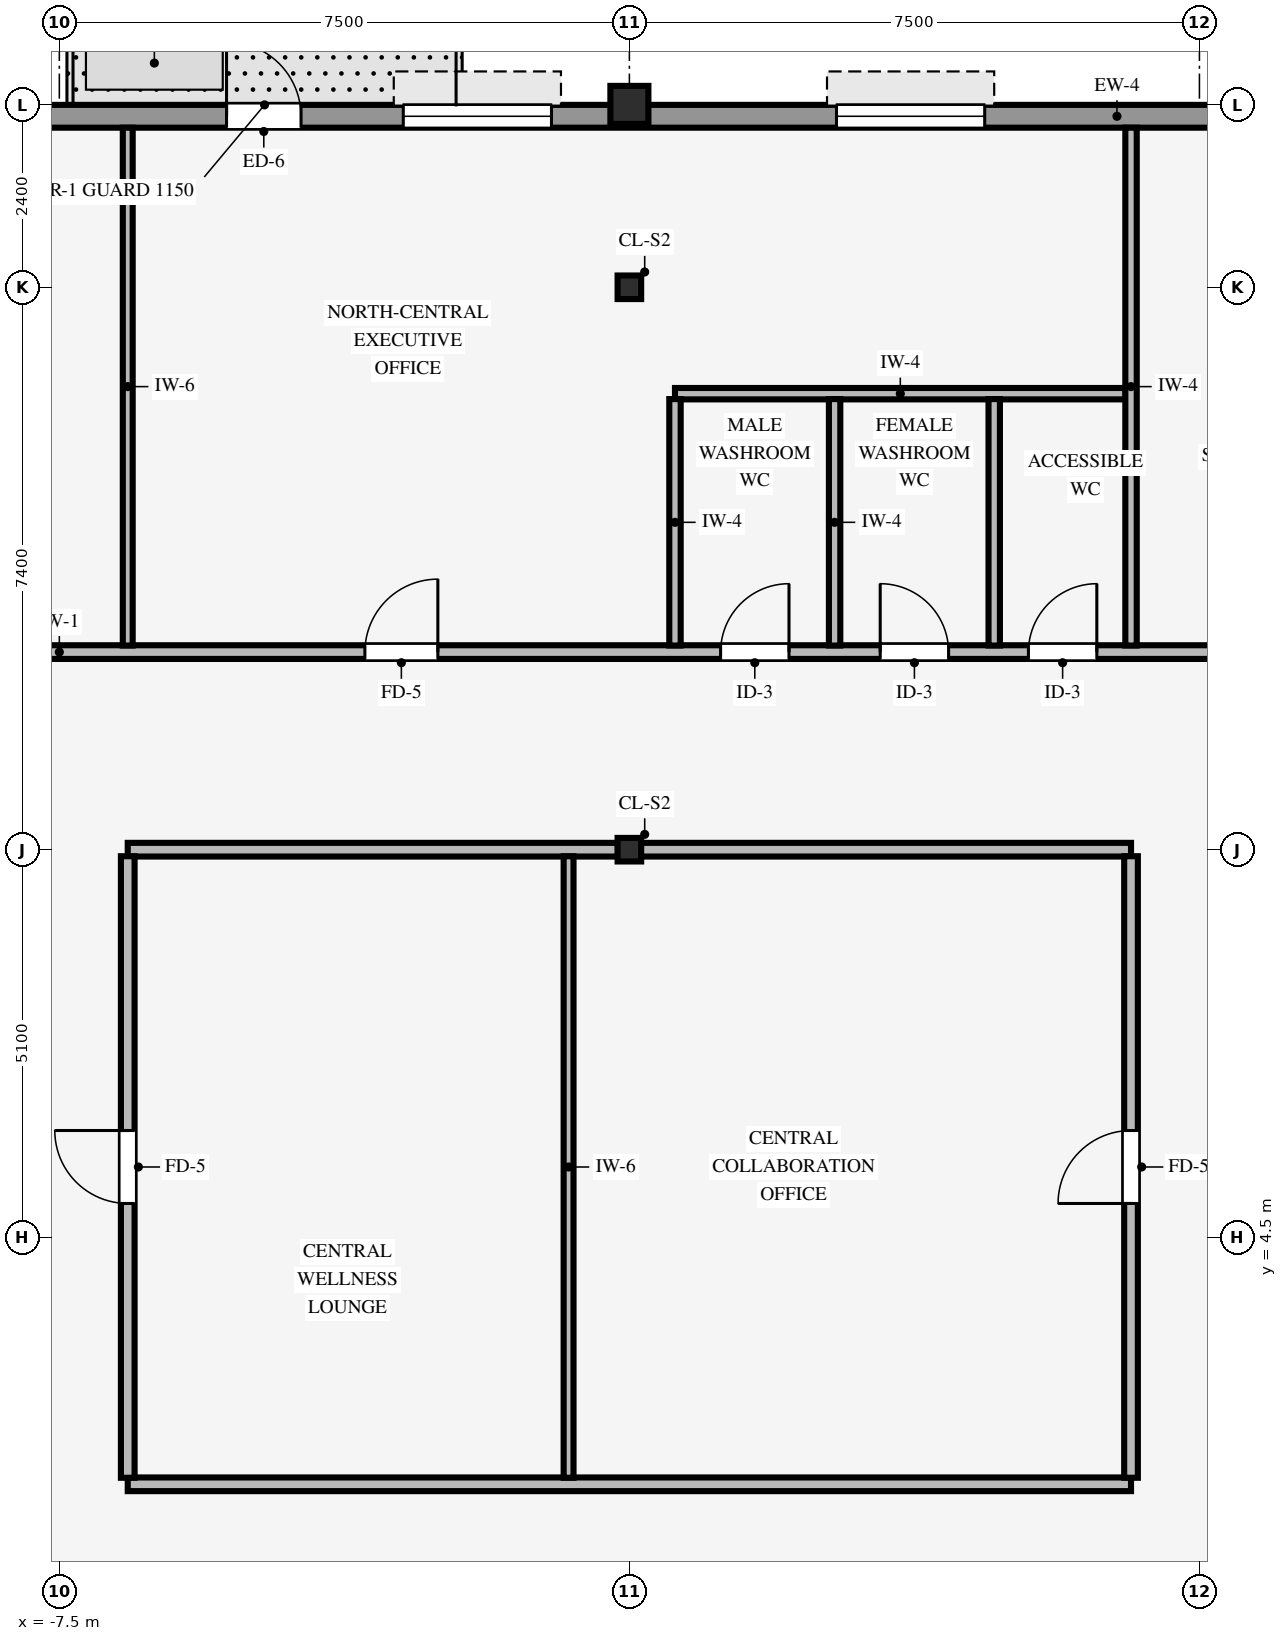
"""IFC4 building model, lengths in metres.
Left out: names, types, materials, properties, quantities, classifications, styles, units other than length and angle.
Written with IfcOpenShell. Run it as: python <this file> out.ifc"""

import sys

from ifc_helpers import new_model, si_unit, direction, frame, frame_2d, origin, origin_2d, place, context, subcontext, project, spatial, rectangle, hollow_rectangle, i_section, extrude, source, transform, mapped, element, fill, save


model = new_model("IFC4")
c1 = context("Model", 3, precision=1e-05, world=origin(), true_north=direction((0.0, 1.0)))
c2 = subcontext(c1, "Body", "Model", "MODEL_VIEW")
j1 = project(units=[si_unit("LENGTHUNIT", "METRE"), si_unit("PLANEANGLEUNIT", "RADIAN")], contexts=[c1])
p1 = place(None, origin())
s1 = spatial("IfcSite", under=j1, at=p1, CompositionType="ELEMENT")
p2 = place(p1, origin())
s2 = spatial("IfcBuilding", under=s1, at=p2, CompositionType="ELEMENT")
p3 = place(p2, frame((0.0, 0.0, 279.85)))
s3 = spatial("IfcBuildingStorey", under=s2, at=p3, CompositionType="ELEMENT", Elevation=279.85)
p4 = place(p3, frame((0.0, 19.4, 0.0), z_axis=(0.0, 0.0, 1.0), x_axis=(1.0, 0.0, 0.0)))
e1 = element("IfcColumn", 1, at=p4, inside=s3, PredefinedType="COLUMN", context=c2, shape_type="SweptSolid", body=[
    extrude(hollow_rectangle(XDim=0.5, YDim=0.5, WallThickness=0.032, InnerFilletRadius=0.032, OuterFilletRadius=0.064, at=origin_2d()), origin(), (0.0, 0.0, 1.0), 3.37),
])
for number, where, z_axis, x_axis in (
    (2, (0.0, 9.6, 0.0), (0.0, 0.0, 1.0), (1.0, 0.0, 0.0)),
    (3, (0.0, 17.0, 0.0), (0.0, 0.0, 1.0), (1.0, 0.0, 0.0)),
):
    element("IfcColumn", number, at=place(p3, frame(where, z_axis=z_axis, x_axis=x_axis)), inside=s3, PredefinedType="COLUMN", context=c2, shape_type="SweptSolid", body=[
        extrude(i_section(OverallWidth=0.31, OverallDepth=0.31, WebThickness=0.015, FlangeThickness=0.015, FilletRadius=0.015, at=origin_2d()), origin(), (0.0, 0.0, 1.0), 3.37),
    ])
p5 = place(p3, frame((-18.9, 19.25, 0.0), z_axis=(0.0, 0.0, 1.0), x_axis=(1.0, 0.0, 0.0)))
e4 = element("IfcWall", 4, at=p5, inside=s3, PredefinedType="STANDARD", context=c2, shape_type="SweptSolid", body=[
    extrude(rectangle(XDim=35.6, YDim=0.3, at=frame_2d((17.8, 0.0))), origin(), (0.0, 0.0, 1.0), 2.705),
])
p6 = place(p5, frame((13.6, 0.0, 0.0)))
e5 = element("IfcOpeningElement", 5, at=p6, cuts=e4, PredefinedType="OPENING", context=c2, shape_type="SweptSolid", body=[
    extrude(rectangle(XDim=0.98, YDim=2.15, at=frame_2d((0.49, 1.075))), frame((0.0, 0.16, 0.0), z_axis=(0.0, -1.0, 0.0), x_axis=(1.0, 0.0, 0.0)), (0.0, 0.0, 1.0), 0.32),
])
p7 = place(p5, frame((2.425, 0.0, 0.8)))
e6 = element("IfcOpeningElement", 6, at=p7, cuts=e4, PredefinedType="OPENING", context=c2, shape_type="SweptSolid", body=[
    extrude(rectangle(XDim=1.95, YDim=1.48, at=frame_2d((0.975, 0.74))), frame((0.0, 0.16, 0.0), z_axis=(0.0, -1.0, 0.0), x_axis=(1.0, 0.0, 0.0)), (0.0, 0.0, 1.0), 0.32),
])
p8 = place(p5, frame((7.225, 0.0, 0.8)))
e7 = element("IfcOpeningElement", 7, at=p8, cuts=e4, PredefinedType="OPENING", context=c2, shape_type="SweptSolid", body=[
    extrude(rectangle(XDim=1.95, YDim=1.48, at=frame_2d((0.975, 0.74))), frame((0.0, 0.16, 0.0), z_axis=(0.0, -1.0, 0.0), x_axis=(1.0, 0.0, 0.0)), (0.0, 0.0, 1.0), 0.32),
])
p9 = place(p5, frame((15.925, 0.0, 0.8)))
e8 = element("IfcOpeningElement", 8, at=p9, cuts=e4, PredefinedType="OPENING", context=c2, shape_type="SweptSolid", body=[
    extrude(rectangle(XDim=1.95, YDim=1.48, at=frame_2d((0.975, 0.74))), frame((0.0, 0.16, 0.0), z_axis=(0.0, -1.0, 0.0), x_axis=(1.0, 0.0, 0.0)), (0.0, 0.0, 1.0), 0.32),
])
p10 = place(p5, frame((21.625, 0.0, 0.8)))
e9 = element("IfcOpeningElement", 9, at=p10, cuts=e4, PredefinedType="OPENING", context=c2, shape_type="SweptSolid", body=[
    extrude(rectangle(XDim=1.95, YDim=1.48, at=frame_2d((0.975, 0.74))), frame((0.0, 0.16, 0.0), z_axis=(0.0, -1.0, 0.0), x_axis=(1.0, 0.0, 0.0)), (0.0, 0.0, 1.0), 0.32),
])
p11 = place(p5, frame((31.225, 0.0, 0.8)))
e10 = element("IfcOpeningElement", 10, at=p11, cuts=e4, PredefinedType="OPENING", context=c2, shape_type="SweptSolid", body=[
    extrude(rectangle(XDim=1.95, YDim=1.48, at=frame_2d((0.975, 0.74))), frame((0.0, 0.16, 0.0), z_axis=(0.0, -1.0, 0.0), x_axis=(1.0, 0.0, 0.0)), (0.0, 0.0, 1.0), 0.32),
])
p12 = place(p3, frame((-6.6, 1.25, 0.0), z_axis=(0.0, 0.0, 1.0), x_axis=(1.0, 0.0, 0.0)))
e11 = element("IfcWall", 11, at=p12, inside=s3, PredefinedType="PARTITIONING", context=c2, shape_type="SweptSolid", body=[
    extrude(rectangle(XDim=13.2, YDim=0.18, at=frame_2d((6.6, 0.0))), origin(), (0.0, 0.0, 1.0), 3.36),
])
for number, where, z_axis, x_axis in (
    (12, (-6.6, 9.6, 0.0), (0.0, 0.0, 1.0), (1.0, 0.0, 0.0)),
    (13, (0.151, 9.6, 0.0), (0.0, 0.0, 1.0), (1.0, 0.0, 0.0)),
):
    element("IfcWall", number, at=place(p3, frame(where, z_axis=z_axis, x_axis=x_axis)), inside=s3, PredefinedType="PARTITIONING", context=c2, shape_type="SweptSolid", body=[
        extrude(rectangle(XDim=6.449, YDim=0.18, at=frame_2d((3.225, 0.0))), origin(), (0.0, 0.0, 1.0), 2.405),
    ])
p13 = place(p3, frame((-15.0, 12.2, 0.0), z_axis=(0.0, 0.0, 1.0), x_axis=(1.0, 0.0, 0.0)))
e14 = element("IfcWall", 14, at=p13, inside=s3, PredefinedType="PARTITIONING", context=c2, shape_type="SweptSolid", body=[
    extrude(rectangle(XDim=30.8, YDim=0.18, at=frame_2d((15.4, 0.0))), origin(), (0.0, 0.0, 1.0), 3.36),
])
p14 = place(p13, frame((11.52, 0.0, 0.0)))
e15 = element("IfcOpeningElement", 15, at=p14, cuts=e14, PredefinedType="OPENING", context=c2, shape_type="SweptSolid", body=[
    extrude(rectangle(XDim=0.96, YDim=2.1, at=frame_2d((0.48, 1.05))), frame((0.0, 0.1, 0.0), z_axis=(0.0, -1.0, 0.0), x_axis=(1.0, 0.0, 0.0)), (0.0, 0.0, 1.0), 0.2),
])
p15 = place(p13, frame((2.52, 0.0, 0.0)))
e16 = element("IfcOpeningElement", 16, at=p15, cuts=e14, PredefinedType="OPENING", context=c2, shape_type="SweptSolid", body=[
    extrude(rectangle(XDim=0.96, YDim=2.1, at=frame_2d((0.48, 1.05))), frame((0.0, 0.1, 0.0), z_axis=(0.0, -1.0, 0.0), x_axis=(1.0, 0.0, 0.0)), (0.0, 0.0, 1.0), 0.2),
])
p16 = place(p13, frame((28.32, 0.0, 0.0)))
e17 = element("IfcOpeningElement", 17, at=p16, cuts=e14, PredefinedType="OPENING", context=c2, shape_type="SweptSolid", body=[
    extrude(rectangle(XDim=0.96, YDim=2.1, at=frame_2d((0.48, 1.05))), frame((0.0, 0.1, 0.0), z_axis=(0.0, -1.0, 0.0), x_axis=(1.0, 0.0, 0.0)), (0.0, 0.0, 1.0), 0.2),
])
p17 = place(p13, frame((24.92, 0.0, 0.0)))
e18 = element("IfcOpeningElement", 18, at=p17, cuts=e14, PredefinedType="OPENING", context=c2, shape_type="SweptSolid", body=[
    extrude(rectangle(XDim=0.96, YDim=2.1, at=frame_2d((0.48, 1.05))), frame((0.0, 0.1, 0.0), z_axis=(0.0, -1.0, 0.0), x_axis=(1.0, 0.0, 0.0)), (0.0, 0.0, 1.0), 0.2),
])
p18 = place(p13, frame((16.2, 0.0, 0.0)))
e19 = element("IfcOpeningElement", 19, at=p18, cuts=e14, PredefinedType="OPENING", context=c2, shape_type="SweptSolid", body=[
    extrude(rectangle(XDim=0.9, YDim=2.1, at=frame_2d((0.45, 1.05))), frame((0.0, 0.1, 0.0), z_axis=(0.0, -1.0, 0.0), x_axis=(1.0, 0.0, 0.0)), (0.0, 0.0, 1.0), 0.2),
])
p19 = place(p13, frame((18.3, 0.0, 0.0)))
e20 = element("IfcOpeningElement", 20, at=p19, cuts=e14, PredefinedType="OPENING", context=c2, shape_type="SweptSolid", body=[
    extrude(rectangle(XDim=0.9, YDim=2.1, at=frame_2d((0.45, 1.05))), frame((0.0, 0.1, 0.0), z_axis=(0.0, -1.0, 0.0), x_axis=(1.0, 0.0, 0.0)), (0.0, 0.0, 1.0), 0.2),
])
p20 = place(p13, frame((20.25, 0.0, 0.0)))
e21 = element("IfcOpeningElement", 21, at=p20, cuts=e14, PredefinedType="OPENING", context=c2, shape_type="SweptSolid", body=[
    extrude(rectangle(XDim=0.9, YDim=2.1, at=frame_2d((0.45, 1.05))), frame((0.0, 0.1, 0.0), z_axis=(0.0, -1.0, 0.0), x_axis=(1.0, 0.0, 0.0)), (0.0, 0.0, 1.0), 0.2),
])
p21 = place(p3, frame((0.6, 15.6, 0.0), z_axis=(0.0, 0.0, 1.0), x_axis=(1.0, 0.0, 0.0)))
e22 = element("IfcWall", 22, at=p21, inside=s3, PredefinedType="PARTITIONING", context=c2, shape_type="SweptSolid", body=[
    extrude(rectangle(XDim=5.929, YDim=0.15, at=frame_2d((2.964, 0.0))), origin(), (0.0, 0.0, 1.0), 3.36),
])
p22 = place(p3, frame((-6.6, 1.336, 0.0), z_axis=(0.0, 0.0, 1.0), x_axis=(0.0, 1.0, 0.0)))
e23 = element("IfcWall", 23, at=p22, inside=s3, PredefinedType="PARTITIONING", context=c2, shape_type="SweptSolid", body=[
    extrude(rectangle(XDim=8.178, YDim=0.18, at=frame_2d((4.089, 0.0))), origin(), (0.0, 0.0, 1.0), 3.36),
])
p23 = place(p22, frame((3.609, 0.0, 0.0)))
e24 = element("IfcOpeningElement", 24, at=p23, cuts=e23, PredefinedType="OPENING", context=c2, shape_type="SweptSolid", body=[
    extrude(rectangle(XDim=0.96, YDim=2.1, at=frame_2d((0.48, 1.05))), frame((0.0, 0.1, 0.0), z_axis=(0.0, -1.0, 0.0), x_axis=(1.0, 0.0, 0.0)), (0.0, 0.0, 1.0), 0.2),
])
p24 = place(p3, frame((-6.6, 12.286, 0.0), z_axis=(0.0, 0.0, 1.0), x_axis=(0.0, 1.0, 0.0)))
e25 = element("IfcWall", 25, at=p24, inside=s3, PredefinedType="PARTITIONING", context=c2, shape_type="SweptSolid", body=[
    extrude(rectangle(XDim=6.814, YDim=0.13, at=frame_2d((3.407, 0.0))), origin(), (0.0, 0.0, 1.0), 3.36),
])
p25 = place(p3, frame((-0.8, 1.336, 0.0), z_axis=(0.0, 0.0, 1.0), x_axis=(0.0, 1.0, 0.0)))
e26 = element("IfcWall", 26, at=p25, inside=s3, PredefinedType="PARTITIONING", context=c2, shape_type="SweptSolid", body=[
    extrude(rectangle(XDim=8.178, YDim=0.13, at=frame_2d((4.089, 0.0))), origin(), (0.0, 0.0, 1.0), 3.36),
])
for number, where, z_axis, x_axis in (
    (27, (0.6, 12.286, 0.0), (0.0, 0.0, 1.0), (0.0, 1.0, 0.0)),
    (28, (2.7, 12.286, 0.0), (0.0, 0.0, 1.0), (0.0, 1.0, 0.0)),
    (29, (4.8, 12.286, 0.0), (0.0, 0.0, 1.0), (0.0, 1.0, 0.0)),
):
    element("IfcWall", number, at=place(p3, frame(where, z_axis=z_axis, x_axis=x_axis)), inside=s3, PredefinedType="PARTITIONING", context=c2, shape_type="SweptSolid", body=[
        extrude(rectangle(XDim=3.243, YDim=0.15, at=frame_2d((1.622, 0.0))), origin(), (0.0, 0.0, 1.0), 3.36),
    ])
p26 = place(p3, frame((6.6, 1.336, 0.0), z_axis=(0.0, 0.0, 1.0), x_axis=(0.0, 1.0, 0.0)))
e30 = element("IfcWall", 30, at=p26, inside=s3, PredefinedType="PARTITIONING", context=c2, shape_type="SweptSolid", body=[
    extrude(rectangle(XDim=8.178, YDim=0.18, at=frame_2d((4.089, 0.0))), origin(), (0.0, 0.0, 1.0), 3.36),
])
p27 = place(p26, frame((3.609, 0.0, 0.0)))
e31 = element("IfcOpeningElement", 31, at=p27, cuts=e30, PredefinedType="OPENING", context=c2, shape_type="SweptSolid", body=[
    extrude(rectangle(XDim=0.96, YDim=2.1, at=frame_2d((0.48, 1.05))), frame((0.0, 0.1, 0.0), z_axis=(0.0, -1.0, 0.0), x_axis=(1.0, 0.0, 0.0)), (0.0, 0.0, 1.0), 0.2),
])
p28 = place(p3, frame((6.6, 12.286, 0.0), z_axis=(0.0, 0.0, 1.0), x_axis=(0.0, 1.0, 0.0)))
e32 = element("IfcWall", 32, at=p28, inside=s3, PredefinedType="PARTITIONING", context=c2, shape_type="SweptSolid", body=[
    extrude(rectangle(XDim=6.814, YDim=0.15, at=frame_2d((3.407, 0.0))), origin(), (0.0, 0.0, 1.0), 3.36),
])
m1 = source(origin(), c2, "Body", "SweptSolid", [
    extrude(rectangle(XDim=0.98, YDim=2.15, at=frame_2d((0.49, 1.075))), frame((0.0, 0.025, 0.0), z_axis=(0.0, -1.0, 0.0), x_axis=(1.0, 0.0, 0.0)), (0.0, 0.0, 1.0), 0.05),
])
p29 = place(p6, origin())
e33 = element("IfcDoor", 33, at=p29, inside=s3, OperationType="SINGLE_SWING_LEFT", PredefinedType="DOOR", context=c2, shape_type="MappedRepresentation", body=[
    mapped(m1, transform((0.0, 0.0, 0.0), scale=1.0)),
])
fill(e5, e33)
m2 = source(origin(), c2, "Body", "SweptSolid", [
    extrude(rectangle(XDim=1.95, YDim=1.48, at=frame_2d((0.975, 0.74))), frame((0.0, 0.03, 0.0), z_axis=(0.0, -1.0, 0.0), x_axis=(1.0, 0.0, 0.0)), (0.0, 0.0, 1.0), 0.06),
])
p30 = place(p9, origin())
e34 = element("IfcWindow", 34, at=p30, inside=s3, PartitioningType="SINGLE_PANEL", PredefinedType="WINDOW", context=c2, shape_type="MappedRepresentation", body=[
    mapped(m2, transform((0.0, 0.0, 0.0), scale=1.0)),
])
fill(e8, e34)
p31 = place(p10, origin())
e35 = element("IfcWindow", 35, at=p31, inside=s3, PartitioningType="SINGLE_PANEL", PredefinedType="WINDOW", context=c2, shape_type="MappedRepresentation", body=[
    mapped(m2, transform((0.0, 0.0, 0.0), scale=1.0)),
])
fill(e9, e35)
m3 = source(origin(), c2, "Body", "SweptSolid", [
    extrude(rectangle(XDim=0.96, YDim=2.1, at=frame_2d((0.48, 1.05))), frame((0.0, 0.025, 0.0), z_axis=(0.0, -1.0, 0.0), x_axis=(1.0, 0.0, 0.0)), (0.0, 0.0, 1.0), 0.05),
])
p32 = place(p23, origin())
e36 = element("IfcDoor", 36, at=p32, inside=s3, OperationType="SINGLE_SWING_RIGHT", PredefinedType="DOOR", context=c2, shape_type="MappedRepresentation", body=[
    mapped(m3, transform((0.0, 0.0, 0.0), scale=1.0)),
])
fill(e24, e36)
p33 = place(p27, origin())
e37 = element("IfcDoor", 37, at=p33, inside=s3, OperationType="SINGLE_SWING_LEFT", PredefinedType="DOOR", context=c2, shape_type="MappedRepresentation", body=[
    mapped(m3, transform((0.0, 0.0, 0.0), scale=1.0)),
])
fill(e31, e37)
p34 = place(p14, origin())
e38 = element("IfcDoor", 38, at=p34, inside=s3, OperationType="SINGLE_SWING_RIGHT", PredefinedType="DOOR", context=c2, shape_type="MappedRepresentation", body=[
    mapped(m3, transform((0.0, 0.0, 0.0), scale=1.0)),
])
fill(e15, e38)
m4 = source(origin(), c2, "Body", "SweptSolid", [
    extrude(rectangle(XDim=0.9, YDim=2.1, at=frame_2d((0.45, 1.05))), frame((0.0, 0.025, 0.0), z_axis=(0.0, -1.0, 0.0), x_axis=(1.0, 0.0, 0.0)), (0.0, 0.0, 1.0), 0.05),
])
p35 = place(p18, origin())
e39 = element("IfcDoor", 39, at=p35, inside=s3, OperationType="SINGLE_SWING_RIGHT", PredefinedType="DOOR", context=c2, shape_type="MappedRepresentation", body=[
    mapped(m4, transform((0.0, 0.0, 0.0), scale=1.0)),
])
fill(e19, e39)
p36 = place(p19, origin())
e40 = element("IfcDoor", 40, at=p36, inside=s3, OperationType="SINGLE_SWING_LEFT", PredefinedType="DOOR", context=c2, shape_type="MappedRepresentation", body=[
    mapped(m4, transform((0.0, 0.0, 0.0), scale=1.0)),
])
fill(e20, e40)
p37 = place(p20, origin())
e41 = element("IfcDoor", 41, at=p37, inside=s3, OperationType="SINGLE_SWING_RIGHT", PredefinedType="DOOR", context=c2, shape_type="MappedRepresentation", body=[
    mapped(m4, transform((0.0, 0.0, 0.0), scale=1.0)),
])
fill(e21, e41)
save(model, sys.argv[1])
